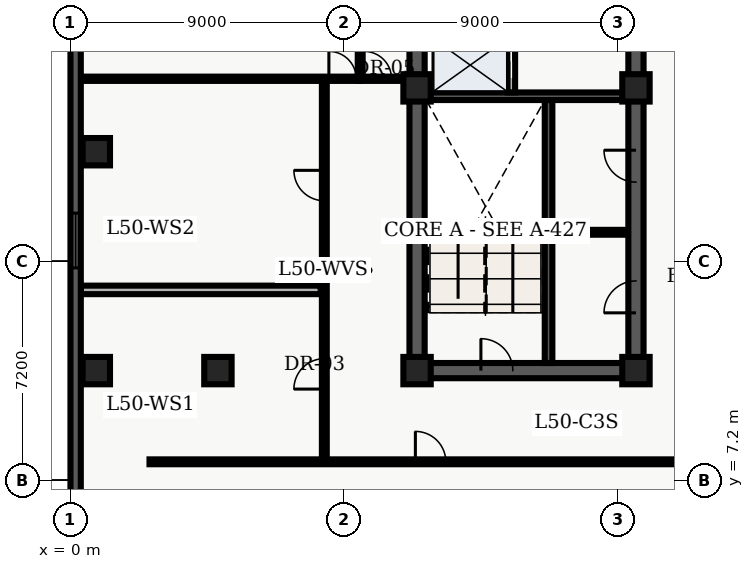
"""IFC4 building model, lengths in metres.
Left out: names, types, materials, properties, quantities, classifications, styles, units other than length and angle.
Written with IfcOpenShell. Run it as: python <this file> out.ifc"""

import sys

from ifc_helpers import new_model, entity, si_unit, converted_unit, direction, frame, origin_with_axes, origin_2d_with_axis, place, context, subcontext, project, spatial, polyline, rectangle, outline, extrude, element, fill, save


model = new_model("IFC4")
c1 = context("Model", 3, precision=1e-05, world=origin_with_axes(), true_north=direction((0.0, 1.0)))
c2 = subcontext(c1, "Body", "Model", "MODEL_VIEW")
j1 = project(units=[si_unit("LENGTHUNIT", "METRE"), converted_unit("PLANEANGLEUNIT", "DEGREE", entity("IfcPlaneAngleMeasure", 0.017), si_unit("PLANEANGLEUNIT", "RADIAN"), dimensions=[0, 0, 0, 0, 0, 0, 0])], contexts=[c1])
p1 = place(None, origin_with_axes())
s1 = spatial("IfcSite", under=j1, at=p1, CompositionType="ELEMENT")
p2 = place(p1, origin_with_axes())
s2 = spatial("IfcBuilding", under=s1, at=p2, CompositionType="ELEMENT")
p3 = place(p2, frame((0.0, 0.0, 204.3), z_axis=(0.0, 0.0, 1.0), x_axis=(1.0, 0.0, 0.0)))
s3 = spatial("IfcBuildingStorey", under=s2, at=p3, CompositionType="ELEMENT", Elevation=204.3)
p4 = place(p3, frame((11.4, 10.8, 0.0), z_axis=(0.0, 0.0, 1.0), x_axis=(0.0, 1.0, 0.0)))
e1 = element("IfcWall", 1, at=p4, inside=s3, PredefinedType="SHEAR", context=c2, shape_type="SweptSolid", body=[
    extrude(outline(polyline([(0.0, -0.25), (27.0, -0.25), (27.0, 0.25), (0.0, 0.25), (0.0, -0.25)])), origin_with_axes(), (0.0, 0.0, 1.0), 3.66),
])
p5 = place(p3, frame((11.4, 10.8, 0.0), z_axis=(0.0, 0.0, 1.0), x_axis=(1.0, 0.0, 0.0)))
e2 = element("IfcWall", 2, at=p5, inside=s3, PredefinedType="SHEAR", context=c2, shape_type="SweptSolid", body=[
    extrude(outline(polyline([(0.0, -0.25), (7.2, -0.25), (7.2, 0.25), (0.0, 0.25), (0.0, -0.25)])), origin_with_axes(), (0.0, 0.0, 1.0), 3.66),
])
p6 = place(p5, frame((2.625, 0.0, 0.0), z_axis=(0.0, 0.0, 1.0), x_axis=(1.0, 0.0, 0.0)))
e3 = element("IfcOpeningElement", 3, at=p6, cuts=e2, PredefinedType="OPENING", context=c2, shape_type="SweptSolid", body=[
    extrude(rectangle(XDim=1.05, YDim=0.52, at=origin_2d_with_axis()), origin_with_axes(), (0.0, 0.0, 1.0), 2.15),
])
p7 = place(p3, frame((18.6, 10.8, 0.0), z_axis=(0.0, 0.0, 1.0), x_axis=(0.0, 1.0, 0.0)))
e4 = element("IfcWall", 4, at=p7, inside=s3, PredefinedType="SHEAR", context=c2, shape_type="SweptSolid", body=[
    extrude(outline(polyline([(0.0, -0.25), (13.5, -0.25), (13.5, 0.25), (0.0, 0.25), (0.0, -0.25)])), origin_with_axes(), (0.0, 0.0, 1.0), 3.66),
])
p8 = place(p7, frame((11.125, 0.0, 0.0), z_axis=(0.0, 0.0, 1.0), x_axis=(1.0, 0.0, 0.0)))
e5 = element("IfcOpeningElement", 5, at=p8, cuts=e4, PredefinedType="OPENING", context=c2, shape_type="SweptSolid", body=[
    extrude(rectangle(XDim=1.05, YDim=0.52, at=origin_2d_with_axis()), origin_with_axes(), (0.0, 0.0, 1.0), 2.15),
])
p9 = place(p7, frame((2.425, 0.0, 0.0), z_axis=(0.0, 0.0, 1.0), x_axis=(1.0, 0.0, 0.0)))
e6 = element("IfcOpeningElement", 6, at=p9, cuts=e4, PredefinedType="OPENING", context=c2, shape_type="SweptSolid", body=[
    extrude(rectangle(XDim=1.05, YDim=0.52, at=origin_2d_with_axis()), origin_with_axes(), (0.0, 0.0, 1.0), 2.15),
])
p10 = place(p7, frame((6.725, 0.0, 0.0), z_axis=(0.0, 0.0, 1.0), x_axis=(1.0, 0.0, 0.0)))
e7 = element("IfcOpeningElement", 7, at=p10, cuts=e4, PredefinedType="OPENING", context=c2, shape_type="SweptSolid", body=[
    extrude(rectangle(XDim=1.05, YDim=0.52, at=origin_2d_with_axis()), origin_with_axes(), (0.0, 0.0, 1.0), 2.15),
])
p11 = place(p3, frame((15.725, 11.05, 0.0), z_axis=(0.0, 0.0, 1.0), x_axis=(0.0, 1.0, 0.0)))
e8 = element("IfcWall", 8, at=p11, inside=s3, PredefinedType="SHEAR", context=c2, shape_type="SweptSolid", body=[
    extrude(outline(polyline([(0.0, -0.125), (8.65, -0.125), (8.65, 0.125), (0.0, 0.125), (0.0, -0.125)])), origin_with_axes(), (0.0, 0.0, 1.0), 3.66),
])
p12 = place(p3, frame((11.65, 19.825, 0.0), z_axis=(0.0, 0.0, 1.0), x_axis=(1.0, 0.0, 0.0)))
e9 = element("IfcWall", 9, at=p12, inside=s3, PredefinedType="SHEAR", context=c2, shape_type="SweptSolid", body=[
    extrude(outline(polyline([(0.0, -0.125), (6.7, -0.125), (6.7, 0.125), (0.0, 0.125), (0.0, -0.125)])), origin_with_axes(), (0.0, 0.0, 1.0), 3.66),
])
p13 = place(p3, frame((14.5, 19.95, 0.0), z_axis=(0.0, 0.0, 1.0), x_axis=(0.0, 1.0, 0.0)))
e10 = element("IfcWall", 10, at=p13, inside=s3, PredefinedType="SOLIDWALL", context=c2, shape_type="SweptSolid", body=[
    extrude(outline(polyline([(0.0, -0.125), (6.25, -0.125), (6.25, 0.125), (0.0, 0.125), (0.0, -0.125)])), origin_with_axes(), (0.0, 0.0, 1.0), 2.7),
])
p14 = place(p13, frame((1.025, 0.0, 0.0), z_axis=(0.0, 0.0, 1.0), x_axis=(1.0, 0.0, 0.0)))
e11 = element("IfcOpeningElement", 11, at=p14, cuts=e10, PredefinedType="OPENING", context=c2, shape_type="SweptSolid", body=[
    extrude(rectangle(XDim=1.1, YDim=0.27, at=origin_2d_with_axis()), origin_with_axes(), (0.0, 0.0, 1.0), 2.15),
])
p15 = place(p13, frame((2.975, 0.0, 0.0), z_axis=(0.0, 0.0, 1.0), x_axis=(1.0, 0.0, 0.0)))
e12 = element("IfcOpeningElement", 12, at=p15, cuts=e10, PredefinedType="OPENING", context=c2, shape_type="SweptSolid", body=[
    extrude(rectangle(XDim=1.1, YDim=0.27, at=origin_2d_with_axis()), origin_with_axes(), (0.0, 0.0, 1.0), 2.15),
])
p16 = place(p13, frame((5.425, 0.0, 0.0), z_axis=(0.0, 0.0, 1.0), x_axis=(1.0, 0.0, 0.0)))
e13 = element("IfcOpeningElement", 13, at=p16, cuts=e10, PredefinedType="OPENING", context=c2, shape_type="SweptSolid", body=[
    extrude(rectangle(XDim=1.2, YDim=0.27, at=origin_2d_with_axis()), origin_with_axes(), (0.0, 0.0, 1.0), 2.15),
])
for number, where, z_axis, x_axis in (
    (14, (11.4, 10.8, 0.0), (0.0, 0.0, 1.0), (1.0, 0.0, 0.0)),
    (15, (11.4, 20.1, 0.0), (0.0, 0.0, 1.0), (1.0, 0.0, 0.0)),
    (16, (18.6, 10.8, 0.0), (0.0, 0.0, 1.0), (1.0, 0.0, 0.0)),
    (17, (18.6, 20.1, 0.0), (0.0, 0.0, 1.0), (1.0, 0.0, 0.0)),
    (18, (4.85, 10.8, 0.0), (0.0, 0.0, 1.0), (1.0, 0.0, 0.0)),
    (19, (0.85, 10.8, 0.0), (0.0, 0.0, 1.0), (1.0, 0.0, 0.0)),
    (20, (0.85, 18.0, 0.0), (0.0, 0.0, 1.0), (1.0, 0.0, 0.0)),
):
    element("IfcColumn", number, at=place(p3, frame(where, z_axis=z_axis, x_axis=x_axis)), inside=s3, PredefinedType="COLUMN", context=c2, shape_type="SweptSolid", body=[
        extrude(rectangle(XDim=0.9, YDim=0.9, at=origin_2d_with_axis()), origin_with_axes(), (0.0, 0.0, 1.0), 3.9),
    ])
p17 = place(p3, frame((15.84, 15.35, 0.0), z_axis=(0.0, 0.0, 1.0), x_axis=(1.0, 0.0, 0.0)))
e21 = element("IfcWall", 21, at=p17, inside=s3, PredefinedType="PARTITIONING", context=c2, shape_type="SweptSolid", body=[
    extrude(outline(polyline([(0.0, -0.08), (2.46, -0.08), (2.46, 0.08), (0.0, 0.08), (0.0, -0.08)])), origin_with_axes(), (0.0, 0.0, 1.0), 2.7),
])
p18 = place(p3, frame((9.52, 20.4, 0.0), z_axis=(0.0, 0.0, 1.0), x_axis=(0.0, 1.0, 0.0)))
e22 = element("IfcWall", 22, at=p18, inside=s3, PredefinedType="PARTITIONING", context=c2, shape_type="SweptSolid", body=[
    extrude(outline(polyline([(0.0, -0.07), (4.0, -0.07), (4.0, 0.07), (0.0, 0.07), (0.0, -0.07)])), origin_with_axes(), (0.0, 0.0, 1.0), 2.7),
])
p19 = place(p3, frame((9.52, 20.4, 0.0), z_axis=(0.0, 0.0, 1.0), x_axis=(1.0, 0.0, 0.0)))
e23 = element("IfcWall", 23, at=p19, inside=s3, PredefinedType="PARTITIONING", context=c2, shape_type="SweptSolid", body=[
    extrude(outline(polyline([(0.0, -0.07), (1.58, -0.07), (1.58, 0.07), (0.0, 0.07), (0.0, -0.07)])), origin_with_axes(), (0.0, 0.0, 1.0), 2.7),
])
p20 = place(p19, frame((0.59, 0.0, 0.0), z_axis=(0.0, 0.0, 1.0), x_axis=(1.0, 0.0, 0.0)))
e24 = element("IfcOpeningElement", 24, at=p20, cuts=e23, PredefinedType="OPENING", context=c2, shape_type="SweptSolid", body=[
    extrude(rectangle(XDim=0.9, YDim=0.16, at=origin_2d_with_axis()), origin_with_axes(), (0.0, 0.0, 1.0), 2.15),
])
p21 = place(p3, frame((2.6, 7.8, 0.0), z_axis=(0.0, 0.0, 1.0), x_axis=(1.0, 0.0, 0.0)))
e25 = element("IfcWall", 25, at=p21, inside=s3, PredefinedType="PARTITIONING", context=c2, shape_type="SweptSolid", body=[
    extrude(outline(polyline([(0.0, -0.08), (18.55, -0.08), (18.55, 0.08), (0.0, 0.08), (0.0, -0.08)])), origin_with_axes(), (0.0, 0.0, 1.0), 2.7),
])
p22 = place(p21, frame((9.245, 0.0, 0.0), z_axis=(0.0, 0.0, 1.0), x_axis=(1.0, 0.0, 0.0)))
e26 = element("IfcOpeningElement", 26, at=p22, cuts=e25, PredefinedType="OPENING", context=c2, shape_type="SweptSolid", body=[
    extrude(rectangle(XDim=1.0, YDim=0.18, at=origin_2d_with_axis()), origin_with_axes(), (0.0, 0.0, 1.0), 2.15),
])
p23 = place(p3, frame((8.35, 7.8, 0.0), z_axis=(0.0, 0.0, 1.0), x_axis=(0.0, 1.0, 0.0)))
e27 = element("IfcWall", 27, at=p23, inside=s3, PredefinedType="PARTITIONING", context=c2, shape_type="SweptSolid", body=[
    extrude(outline(polyline([(0.0, -0.08), (12.6, -0.08), (12.6, 0.08), (0.0, 0.08), (0.0, -0.08)])), origin_with_axes(), (0.0, 0.0, 1.0), 2.7),
])
p24 = place(p23, frame((2.893, 0.0, 0.0), z_axis=(0.0, 0.0, 1.0), x_axis=(1.0, 0.0, 0.0)))
e28 = element("IfcOpeningElement", 28, at=p24, cuts=e27, PredefinedType="OPENING", context=c2, shape_type="SweptSolid", body=[
    extrude(rectangle(XDim=1.0, YDim=0.18, at=origin_2d_with_axis()), origin_with_axes(), (0.0, 0.0, 1.0), 2.15),
])
p25 = place(p23, frame((9.088, 0.0, 0.0), z_axis=(0.0, 0.0, 1.0), x_axis=(1.0, 0.0, 0.0)))
e29 = element("IfcOpeningElement", 29, at=p25, cuts=e27, PredefinedType="OPENING", context=c2, shape_type="SweptSolid", body=[
    extrude(rectangle(XDim=1.0, YDim=0.18, at=origin_2d_with_axis()), origin_with_axes(), (0.0, 0.0, 1.0), 2.15),
])
p26 = place(p3, frame((0.335, 20.4, 0.0), z_axis=(0.0, 0.0, 1.0), x_axis=(1.0, 0.0, 0.0)))
e30 = element("IfcWall", 30, at=p26, inside=s3, PredefinedType="PARTITIONING", context=c2, shape_type="SweptSolid", body=[
    extrude(outline(polyline([(0.0, -0.07), (9.185, -0.07), (9.185, 0.07), (0.0, 0.07), (0.0, -0.07)])), origin_with_axes(), (0.0, 0.0, 1.0), 2.7),
])
p27 = place(p26, frame((8.615, 0.0, 0.0), z_axis=(0.0, 0.0, 1.0), x_axis=(1.0, 0.0, 0.0)))
e31 = element("IfcOpeningElement", 31, at=p27, cuts=e30, PredefinedType="OPENING", context=c2, shape_type="SweptSolid", body=[
    extrude(rectangle(XDim=0.9, YDim=0.16, at=origin_2d_with_axis()), origin_with_axes(), (0.0, 0.0, 1.0), 2.15),
])
p28 = place(p3, frame((0.335, 13.455, 0.0), z_axis=(0.0, 0.0, 1.0), x_axis=(1.0, 0.0, 0.0)))
e32 = element("IfcWall", 32, at=p28, inside=s3, PredefinedType="PARTITIONING", context=c2, shape_type="SweptSolid", body=[
    extrude(outline(polyline([(0.0, -0.14), (7.895, -0.14), (7.895, 0.14), (0.0, 0.14), (0.0, -0.14)])), origin_with_axes(), (0.0, 0.0, 1.0), 2.7),
])
p29 = place(p3, frame((0.17, 2.74, 0.0), z_axis=(0.0, 0.0, 1.0), x_axis=(0.0, 1.0, 0.0)))
e33 = element("IfcWall", 33, at=p29, inside=s3, PredefinedType="SOLIDWALL", context=c2, shape_type="SweptSolid", body=[
    extrude(outline(polyline([(0.0, -0.17), (43.46, -0.17), (43.46, 0.17), (0.0, 0.17), (0.0, -0.17)])), origin_with_axes(), (0.0, 0.0, 1.0), 3.66),
])
p30 = place(p29, frame((2.948, 0.0, 0.45), z_axis=(0.0, 0.0, 1.0), x_axis=(1.0, 0.0, 0.0)))
e34 = element("IfcOpeningElement", 34, at=p30, cuts=e33, PredefinedType="OPENING", context=c2, shape_type="SweptSolid", body=[
    extrude(rectangle(XDim=1.8, YDim=0.36, at=origin_2d_with_axis()), origin_with_axes(), (0.0, 0.0, 1.0), 2.1),
])
p31 = place(p29, frame((12.339, 0.0, 0.45), z_axis=(0.0, 0.0, 1.0), x_axis=(1.0, 0.0, 0.0)))
e35 = element("IfcOpeningElement", 35, at=p31, cuts=e33, PredefinedType="OPENING", context=c2, shape_type="SweptSolid", body=[
    extrude(rectangle(XDim=1.8, YDim=0.36, at=origin_2d_with_axis()), origin_with_axes(), (0.0, 0.0, 1.0), 2.1),
])
p32 = place(p29, frame((26.426, 0.0, 0.45), z_axis=(0.0, 0.0, 1.0), x_axis=(1.0, 0.0, 0.0)))
e36 = element("IfcOpeningElement", 36, at=p32, cuts=e33, PredefinedType="OPENING", context=c2, shape_type="SweptSolid", body=[
    extrude(rectangle(XDim=1.8, YDim=0.36, at=origin_2d_with_axis()), origin_with_axes(), (0.0, 0.0, 1.0), 2.1),
])
p33 = place(p29, frame((31.121, 0.0, 0.45), z_axis=(0.0, 0.0, 1.0), x_axis=(1.0, 0.0, 0.0)))
e37 = element("IfcOpeningElement", 37, at=p33, cuts=e33, PredefinedType="OPENING", context=c2, shape_type="SweptSolid", body=[
    extrude(rectangle(XDim=1.8, YDim=0.36, at=origin_2d_with_axis()), origin_with_axes(), (0.0, 0.0, 1.0), 2.1),
])
p34 = place(p29, frame((40.062, 0.0, 0.45), z_axis=(0.0, 0.0, 1.0), x_axis=(1.0, 0.0, 0.0)))
e38 = element("IfcOpeningElement", 38, at=p34, cuts=e33, PredefinedType="OPENING", context=c2, shape_type="SweptSolid", body=[
    extrude(rectangle(XDim=1.8, YDim=0.36, at=origin_2d_with_axis()), origin_with_axes(), (0.0, 0.0, 1.0), 2.1),
])
p35 = place(p13, frame((1.025, 0.0, 0.0), z_axis=(0.0, 0.0, 1.0), x_axis=(1.0, 0.0, 0.0)))
e39 = element("IfcDoor", 39, at=p35, inside=s3, OperationType="SLIDING_TO_LEFT", PredefinedType="DOOR", context=c2, shape_type="SweptSolid", body=[
    extrude(rectangle(XDim=1.1, YDim=0.09, at=origin_2d_with_axis()), origin_with_axes(), (0.0, 0.0, 1.0), 2.15),
])
fill(e11, e39)
p36 = place(p5, frame((2.625, 0.0, 0.0), z_axis=(0.0, 0.0, 1.0), x_axis=(1.0, 0.0, 0.0)))
e40 = element("IfcDoor", 40, at=p36, inside=s3, OperationType="SINGLE_SWING_LEFT", PredefinedType="DOOR", context=c2, shape_type="SweptSolid", body=[
    extrude(rectangle(XDim=1.05, YDim=0.09, at=origin_2d_with_axis()), origin_with_axes(), (0.0, 0.0, 1.0), 2.15),
])
fill(e3, e40)
p37 = place(p7, frame((2.425, 0.0, 0.0), z_axis=(0.0, 0.0, 1.0), x_axis=(1.0, 0.0, 0.0)))
e41 = element("IfcDoor", 41, at=p37, inside=s3, OperationType="SINGLE_SWING_LEFT", PredefinedType="DOOR", context=c2, shape_type="SweptSolid", body=[
    extrude(rectangle(XDim=1.05, YDim=0.09, at=origin_2d_with_axis()), origin_with_axes(), (0.0, 0.0, 1.0), 2.15),
])
fill(e6, e41)
p38 = place(p7, frame((6.725, 0.0, 0.0), z_axis=(0.0, 0.0, 1.0), x_axis=(1.0, 0.0, 0.0)))
e42 = element("IfcDoor", 42, at=p38, inside=s3, OperationType="SINGLE_SWING_RIGHT", PredefinedType="DOOR", context=c2, shape_type="SweptSolid", body=[
    extrude(rectangle(XDim=1.05, YDim=0.09, at=origin_2d_with_axis()), origin_with_axes(), (0.0, 0.0, 1.0), 2.15),
])
fill(e7, e42)
p39 = place(p19, frame((0.59, 0.0, 0.0), z_axis=(0.0, 0.0, 1.0), x_axis=(1.0, 0.0, 0.0)))
e43 = element("IfcDoor", 43, at=p39, inside=s3, OperationType="SINGLE_SWING_LEFT", PredefinedType="DOOR", context=c2, shape_type="SweptSolid", body=[
    extrude(rectangle(XDim=0.9, YDim=0.084, at=origin_2d_with_axis()), origin_with_axes(), (0.0, 0.0, 1.0), 2.15),
])
fill(e24, e43)
p40 = place(p26, frame((8.615, 0.0, 0.0), z_axis=(0.0, 0.0, 1.0), x_axis=(1.0, 0.0, 0.0)))
e44 = element("IfcDoor", 44, at=p40, inside=s3, OperationType="SINGLE_SWING_LEFT", PredefinedType="DOOR", context=c2, shape_type="SweptSolid", body=[
    extrude(rectangle(XDim=0.9, YDim=0.084, at=origin_2d_with_axis()), origin_with_axes(), (0.0, 0.0, 1.0), 2.15),
])
fill(e31, e44)
p41 = place(p23, frame((2.893, 0.0, 0.0), z_axis=(0.0, 0.0, 1.0), x_axis=(1.0, 0.0, 0.0)))
e45 = element("IfcDoor", 45, at=p41, inside=s3, OperationType="SINGLE_SWING_LEFT", PredefinedType="DOOR", context=c2, shape_type="SweptSolid", body=[
    extrude(rectangle(XDim=1.0, YDim=0.09, at=origin_2d_with_axis()), origin_with_axes(), (0.0, 0.0, 1.0), 2.15),
])
fill(e28, e45)
p42 = place(p23, frame((9.088, 0.0, 0.0), z_axis=(0.0, 0.0, 1.0), x_axis=(1.0, 0.0, 0.0)))
e46 = element("IfcDoor", 46, at=p42, inside=s3, OperationType="SINGLE_SWING_RIGHT", PredefinedType="DOOR", context=c2, shape_type="SweptSolid", body=[
    extrude(rectangle(XDim=1.0, YDim=0.09, at=origin_2d_with_axis()), origin_with_axes(), (0.0, 0.0, 1.0), 2.15),
])
fill(e29, e46)
p43 = place(p21, frame((9.245, 0.0, 0.0), z_axis=(0.0, 0.0, 1.0), x_axis=(1.0, 0.0, 0.0)))
e47 = element("IfcDoor", 47, at=p43, inside=s3, OperationType="SINGLE_SWING_LEFT", PredefinedType="DOOR", context=c2, shape_type="SweptSolid", body=[
    extrude(rectangle(XDim=1.0, YDim=0.09, at=origin_2d_with_axis()), origin_with_axes(), (0.0, 0.0, 1.0), 2.15),
])
fill(e26, e47)
p44 = place(p29, frame((12.339, 0.0, 0.45), z_axis=(0.0, 0.0, 1.0), x_axis=(1.0, 0.0, 0.0)))
e48 = element("IfcWindow", 48, at=p44, inside=s3, PredefinedType="WINDOW", context=c2, shape_type="SweptSolid", body=[
    extrude(rectangle(XDim=1.8, YDim=0.09, at=origin_2d_with_axis()), origin_with_axes(), (0.0, 0.0, 1.0), 2.1),
])
fill(e35, e48)
save(model, sys.argv[1])
